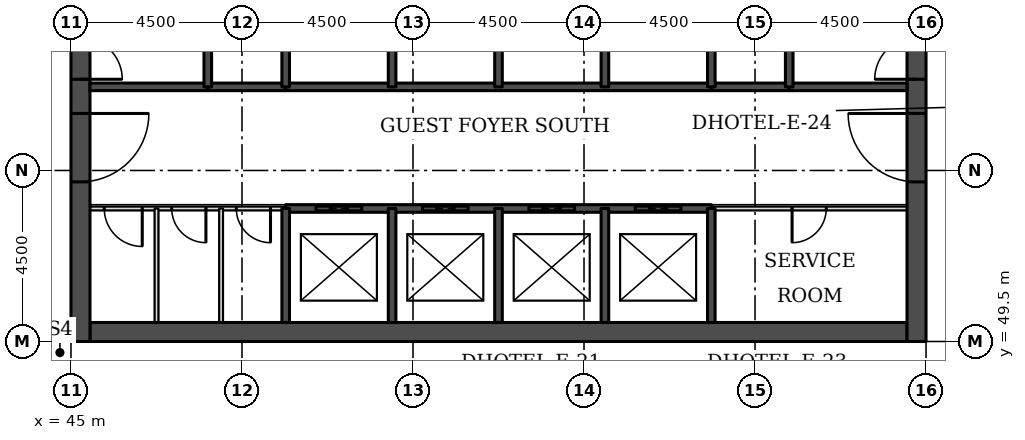
"""IFC4 building model, lengths in metres.
Left out: names, types, materials, properties, quantities, classifications, styles, units other than length and angle.
Written with IfcOpenShell. Run it as: python <this file> out.ifc"""

import sys

from ifc_helpers import new_model, si_unit, direction, frame, frame_2d, origin, place, context, subcontext, project, spatial, rectangle, extrude, element, fill, save


model = new_model("IFC4")
c1 = context("Model", 3, precision=1e-05, world=origin(), true_north=direction((0.0, 1.0)))
c2 = subcontext(c1, "Body", "Model", "MODEL_VIEW")
j1 = project(units=[si_unit("LENGTHUNIT", "METRE"), si_unit("PLANEANGLEUNIT", "RADIAN")], contexts=[c1])
p1 = place(None, origin())
s1 = spatial("IfcSite", under=j1, at=p1, CompositionType="ELEMENT")
p2 = place(p1, origin())
s2 = spatial("IfcBuilding", under=s1, at=p2, CompositionType="ELEMENT")
p3 = place(p2, frame((0.0, 0.0, 39.6)))
s3 = spatial("IfcBuildingStorey", under=s2, at=p3, CompositionType="ELEMENT", Elevation=39.6)
p4 = place(p3, frame((45.5, 49.75, 0.0), z_axis=(0.0, 0.0, 1.0), x_axis=(1.0, 0.0, 0.0)))
e1 = element("IfcWall", 1, at=p4, inside=s3, PredefinedType="SHEAR", context=c2, shape_type="SweptSolid", body=[
    extrude(rectangle(XDim=21.5, YDim=0.5, at=frame_2d((10.75, 0.0))), origin(), (0.0, 0.0, 1.0), 3.3),
])
p5 = place(p3, frame((45.25, 49.5, 0.0), z_axis=(0.0, 0.0, 1.0), x_axis=(0.0, 1.0, 0.0)))
e2 = element("IfcWall", 2, at=p5, inside=s3, PredefinedType="SHEAR", context=c2, shape_type="SweptSolid", body=[
    extrude(rectangle(XDim=22.5, YDim=0.5, at=frame_2d((11.25, 0.0))), origin(), (0.0, 0.0, 1.0), 3.3),
])
p6 = place(p5, frame((4.2, 0.0, 0.0)))
e3 = element("IfcOpeningElement", 3, at=p6, cuts=e2, PredefinedType="OPENING", context=c2, shape_type="SweptSolid", body=[
    extrude(rectangle(XDim=1.8, YDim=2.1, at=frame_2d((0.9, 1.05))), frame((0.0, 0.26, 0.0), z_axis=(0.0, -1.0, 0.0), x_axis=(1.0, 0.0, 0.0)), (0.0, 0.0, 1.0), 0.52),
])
p7 = place(p5, frame((6.9, 0.0, 0.0)))
e4 = element("IfcOpeningElement", 4, at=p7, cuts=e2, PredefinedType="OPENING", context=c2, shape_type="SweptSolid", body=[
    extrude(rectangle(XDim=1.1, YDim=2.1, at=frame_2d((0.55, 1.05))), frame((0.0, 0.26, 0.0), z_axis=(0.0, -1.0, 0.0), x_axis=(1.0, 0.0, 0.0)), (0.0, 0.0, 1.0), 0.52),
])
p8 = place(p5, frame((13.6, 0.0, 0.0)))
e5 = element("IfcOpeningElement", 5, at=p8, cuts=e2, PredefinedType="OPENING", context=c2, shape_type="SweptSolid", body=[
    extrude(rectangle(XDim=1.1, YDim=2.1, at=frame_2d((0.55, 1.05))), frame((0.0, 0.26, 0.0), z_axis=(0.0, -1.0, 0.0), x_axis=(1.0, 0.0, 0.0)), (0.0, 0.0, 1.0), 0.52),
])
p9 = place(p5, frame((16.5, 0.0, 0.0)))
e6 = element("IfcOpeningElement", 6, at=p9, cuts=e2, PredefinedType="OPENING", context=c2, shape_type="SweptSolid", body=[
    extrude(rectangle(XDim=1.8, YDim=2.1, at=frame_2d((0.9, 1.05))), frame((0.0, 0.26, 0.0), z_axis=(0.0, -1.0, 0.0), x_axis=(1.0, 0.0, 0.0)), (0.0, 0.0, 1.0), 0.52),
])
p10 = place(p3, frame((67.25, 49.5, 0.0), z_axis=(0.0, 0.0, 1.0), x_axis=(0.0, 1.0, 0.0)))
e7 = element("IfcWall", 7, at=p10, inside=s3, PredefinedType="SHEAR", context=c2, shape_type="SweptSolid", body=[
    extrude(rectangle(XDim=22.5, YDim=0.5, at=frame_2d((11.25, 0.0))), origin(), (0.0, 0.0, 1.0), 3.3),
])
p11 = place(p10, frame((4.2, 0.0, 0.0)))
e8 = element("IfcOpeningElement", 8, at=p11, cuts=e7, PredefinedType="OPENING", context=c2, shape_type="SweptSolid", body=[
    extrude(rectangle(XDim=1.8, YDim=2.1, at=frame_2d((0.9, 1.05))), frame((0.0, 0.26, 0.0), z_axis=(0.0, -1.0, 0.0), x_axis=(1.0, 0.0, 0.0)), (0.0, 0.0, 1.0), 0.52),
])
p12 = place(p10, frame((6.9, 0.0, 0.0)))
e9 = element("IfcOpeningElement", 9, at=p12, cuts=e7, PredefinedType="OPENING", context=c2, shape_type="SweptSolid", body=[
    extrude(rectangle(XDim=1.1, YDim=2.1, at=frame_2d((0.55, 1.05))), frame((0.0, 0.26, 0.0), z_axis=(0.0, -1.0, 0.0), x_axis=(1.0, 0.0, 0.0)), (0.0, 0.0, 1.0), 0.52),
])
p13 = place(p10, frame((13.6, 0.0, 0.0)))
e10 = element("IfcOpeningElement", 10, at=p13, cuts=e7, PredefinedType="OPENING", context=c2, shape_type="SweptSolid", body=[
    extrude(rectangle(XDim=1.1, YDim=2.1, at=frame_2d((0.55, 1.05))), frame((0.0, 0.26, 0.0), z_axis=(0.0, -1.0, 0.0), x_axis=(1.0, 0.0, 0.0)), (0.0, 0.0, 1.0), 0.52),
])
p14 = place(p10, frame((16.5, 0.0, 0.0)))
e11 = element("IfcOpeningElement", 11, at=p14, cuts=e7, PredefinedType="OPENING", context=c2, shape_type="SweptSolid", body=[
    extrude(rectangle(XDim=1.8, YDim=2.1, at=frame_2d((0.9, 1.05))), frame((0.0, 0.26, 0.0), z_axis=(0.0, -1.0, 0.0), x_axis=(1.0, 0.0, 0.0)), (0.0, 0.0, 1.0), 0.52),
])
p15 = place(p3, frame((45.5, 53.0, 0.0), z_axis=(0.0, 0.0, 1.0), x_axis=(1.0, 0.0, 0.0)))
e12 = element("IfcWall", 12, at=p15, inside=s3, PredefinedType="PARTITIONING", context=c2, shape_type="SweptSolid", body=[
    extrude(rectangle(XDim=5.15, YDim=0.1, at=frame_2d((2.575, 0.0))), origin(), (0.0, 0.0, 1.0), 3.08),
])
p16 = place(p15, frame((0.375, 0.0, 0.0)))
e13 = element("IfcOpeningElement", 13, at=p16, cuts=e12, PredefinedType="OPENING", context=c2, shape_type="SweptSolid", body=[
    extrude(rectangle(XDim=1.0, YDim=2.1, at=frame_2d((0.5, 1.05))), frame((0.0, 0.06, 0.0), z_axis=(0.0, -1.0, 0.0), x_axis=(1.0, 0.0, 0.0)), (0.0, 0.0, 1.0), 0.12),
])
p17 = place(p15, frame((2.151, 0.0, 0.0)))
e14 = element("IfcOpeningElement", 14, at=p17, cuts=e12, PredefinedType="OPENING", context=c2, shape_type="SweptSolid", body=[
    extrude(rectangle(XDim=0.9, YDim=2.1, at=frame_2d((0.45, 1.05))), frame((0.0, 0.06, 0.0), z_axis=(0.0, -1.0, 0.0), x_axis=(1.0, 0.0, 0.0)), (0.0, 0.0, 1.0), 0.12),
])
p18 = place(p15, frame((3.85, 0.0, 0.0)))
e15 = element("IfcOpeningElement", 15, at=p18, cuts=e12, PredefinedType="OPENING", context=c2, shape_type="SweptSolid", body=[
    extrude(rectangle(XDim=0.9, YDim=2.1, at=frame_2d((0.45, 1.05))), frame((0.0, 0.06, 0.0), z_axis=(0.0, -1.0, 0.0), x_axis=(1.0, 0.0, 0.0)), (0.0, 0.0, 1.0), 0.12),
])
p19 = place(p3, frame((61.85, 53.0, 0.0), z_axis=(0.0, 0.0, 1.0), x_axis=(1.0, 0.0, 0.0)))
e16 = element("IfcWall", 16, at=p19, inside=s3, PredefinedType="PARTITIONING", context=c2, shape_type="SweptSolid", body=[
    extrude(rectangle(XDim=5.15, YDim=0.1, at=frame_2d((2.575, 0.0))), origin(), (0.0, 0.0, 1.0), 3.08),
])
p20 = place(p19, frame((2.125, 0.0, 0.0)))
e17 = element("IfcOpeningElement", 17, at=p20, cuts=e16, PredefinedType="OPENING", context=c2, shape_type="SweptSolid", body=[
    extrude(rectangle(XDim=0.9, YDim=2.1, at=frame_2d((0.45, 1.05))), frame((0.0, 0.06, 0.0), z_axis=(0.0, -1.0, 0.0), x_axis=(1.0, 0.0, 0.0)), (0.0, 0.0, 1.0), 0.12),
])
p21 = place(p3, frame((50.65, 53.0, 0.0), z_axis=(0.0, 0.0, 1.0), x_axis=(1.0, 0.0, 0.0)))
e18 = element("IfcWall", 18, at=p21, inside=s3, PredefinedType="SOLIDWALL", context=c2, shape_type="SweptSolid", body=[
    extrude(rectangle(XDim=11.2, YDim=0.2, at=frame_2d((5.6, 0.0))), origin(), (0.0, 0.0, 1.0), 3.08),
])
p22 = place(p21, frame((0.8, 0.0, 0.0)))
e19 = element("IfcOpeningElement", 19, at=p22, cuts=e18, PredefinedType="OPENING", context=c2, shape_type="SweptSolid", body=[
    extrude(rectangle(XDim=1.2, YDim=2.1, at=frame_2d((0.6, 1.05))), frame((0.0, 0.11, 0.0), z_axis=(0.0, -1.0, 0.0), x_axis=(1.0, 0.0, 0.0)), (0.0, 0.0, 1.0), 0.22),
])
p23 = place(p21, frame((3.6, 0.0, 0.0)))
e20 = element("IfcOpeningElement", 20, at=p23, cuts=e18, PredefinedType="OPENING", context=c2, shape_type="SweptSolid", body=[
    extrude(rectangle(XDim=1.2, YDim=2.1, at=frame_2d((0.6, 1.05))), frame((0.0, 0.11, 0.0), z_axis=(0.0, -1.0, 0.0), x_axis=(1.0, 0.0, 0.0)), (0.0, 0.0, 1.0), 0.22),
])
p24 = place(p21, frame((6.4, 0.0, 0.0)))
e21 = element("IfcOpeningElement", 21, at=p24, cuts=e18, PredefinedType="OPENING", context=c2, shape_type="SweptSolid", body=[
    extrude(rectangle(XDim=1.2, YDim=2.1, at=frame_2d((0.6, 1.05))), frame((0.0, 0.11, 0.0), z_axis=(0.0, -1.0, 0.0), x_axis=(1.0, 0.0, 0.0)), (0.0, 0.0, 1.0), 0.22),
])
p25 = place(p21, frame((9.2, 0.0, 0.0)))
e22 = element("IfcOpeningElement", 22, at=p25, cuts=e18, PredefinedType="OPENING", context=c2, shape_type="SweptSolid", body=[
    extrude(rectangle(XDim=1.2, YDim=2.1, at=frame_2d((0.6, 1.05))), frame((0.0, 0.11, 0.0), z_axis=(0.0, -1.0, 0.0), x_axis=(1.0, 0.0, 0.0)), (0.0, 0.0, 1.0), 0.22),
])
for number, where, z_axis, x_axis in (
    (23, (48.6, 56.2, 0.0), (0.0, 0.0, 1.0), (1.0, 0.0, 0.0)),
    (24, (61.85, 56.2, 0.0), (0.0, 0.0, 1.0), (1.0, 0.0, 0.0)),
):
    element("IfcWall", number, at=place(p3, frame(where, z_axis=z_axis, x_axis=x_axis)), inside=s3, PredefinedType="SOLIDWALL", context=c2, shape_type="SweptSolid", body=[
        extrude(rectangle(XDim=2.05, YDim=0.2, at=frame_2d((1.025, 0.0))), origin(), (0.0, 0.0, 1.0), 3.08),
    ])
p26 = place(p3, frame((45.5, 56.2, 0.0), z_axis=(0.0, 0.0, 1.0), x_axis=(1.0, 0.0, 0.0)))
e25 = element("IfcWall", 25, at=p26, inside=s3, PredefinedType="SOLIDWALL", context=c2, shape_type="SweptSolid", body=[
    extrude(rectangle(XDim=3.1, YDim=0.2, at=frame_2d((1.55, 0.0))), origin(), (0.0, 0.0, 1.0), 3.08),
])
p27 = place(p3, frame((50.65, 56.2, 0.0), z_axis=(0.0, 0.0, 1.0), x_axis=(1.0, 0.0, 0.0)))
e26 = element("IfcWall", 26, at=p27, inside=s3, PredefinedType="SOLIDWALL", context=c2, shape_type="SweptSolid", body=[
    extrude(rectangle(XDim=11.2, YDim=0.2, at=frame_2d((5.6, 0.0))), origin(), (0.0, 0.0, 1.0), 3.08),
])
p28 = place(p3, frame((63.9, 56.2, 0.0), z_axis=(0.0, 0.0, 1.0), x_axis=(1.0, 0.0, 0.0)))
e27 = element("IfcWall", 27, at=p28, inside=s3, PredefinedType="SOLIDWALL", context=c2, shape_type="SweptSolid", body=[
    extrude(rectangle(XDim=3.1, YDim=0.2, at=frame_2d((1.55, 0.0))), origin(), (0.0, 0.0, 1.0), 3.08),
])
p29 = place(p3, frame((47.251, 50.0, 0.0), z_axis=(0.0, 0.0, 1.0), x_axis=(0.0, 1.0, 0.0)))
e28 = element("IfcWall", 28, at=p29, inside=s3, PredefinedType="PARTITIONING", context=c2, shape_type="SweptSolid", body=[
    extrude(rectangle(XDim=3.0, YDim=0.1, at=frame_2d((1.5, 0.0))), origin(), (0.0, 0.0, 1.0), 3.08),
])
p30 = place(p3, frame((48.6, 56.2, 0.0), z_axis=(0.0, 0.0, 1.0), x_axis=(0.0, 1.0, 0.0)))
e29 = element("IfcWall", 29, at=p30, inside=s3, PredefinedType="SOLIDWALL", context=c2, shape_type="SweptSolid", body=[
    extrude(rectangle(XDim=5.8, YDim=0.2, at=frame_2d((2.9, 0.0))), origin(), (0.0, 0.0, 1.0), 3.08),
])
p31 = place(p3, frame((48.95, 50.0, 0.0), z_axis=(0.0, 0.0, 1.0), x_axis=(0.0, 1.0, 0.0)))
e30 = element("IfcWall", 30, at=p31, inside=s3, PredefinedType="PARTITIONING", context=c2, shape_type="SweptSolid", body=[
    extrude(rectangle(XDim=3.0, YDim=0.1, at=frame_2d((1.5, 0.0))), origin(), (0.0, 0.0, 1.0), 3.08),
])
p32 = place(p3, frame((50.65, 50.0, 0.0), z_axis=(0.0, 0.0, 1.0), x_axis=(0.0, 1.0, 0.0)))
e31 = element("IfcWall", 31, at=p32, inside=s3, PredefinedType="SOLIDWALL", context=c2, shape_type="SweptSolid", body=[
    extrude(rectangle(XDim=3.0, YDim=0.2, at=frame_2d((1.5, 0.0))), origin(), (0.0, 0.0, 1.0), 3.08),
])
p33 = place(p3, frame((50.65, 56.2, 0.0), z_axis=(0.0, 0.0, 1.0), x_axis=(0.0, 1.0, 0.0)))
e32 = element("IfcWall", 32, at=p33, inside=s3, PredefinedType="SOLIDWALL", context=c2, shape_type="SweptSolid", body=[
    extrude(rectangle(XDim=2.8, YDim=0.2, at=frame_2d((1.4, 0.0))), origin(), (0.0, 0.0, 1.0), 3.08),
])
p34 = place(p3, frame((53.45, 50.0, 0.0), z_axis=(0.0, 0.0, 1.0), x_axis=(0.0, 1.0, 0.0)))
e33 = element("IfcWall", 33, at=p34, inside=s3, PredefinedType="SOLIDWALL", context=c2, shape_type="SweptSolid", body=[
    extrude(rectangle(XDim=3.0, YDim=0.2, at=frame_2d((1.5, 0.0))), origin(), (0.0, 0.0, 1.0), 3.08),
])
p35 = place(p3, frame((53.45, 56.2, 0.0), z_axis=(0.0, 0.0, 1.0), x_axis=(0.0, 1.0, 0.0)))
e34 = element("IfcWall", 34, at=p35, inside=s3, PredefinedType="SOLIDWALL", context=c2, shape_type="SweptSolid", body=[
    extrude(rectangle(XDim=2.8, YDim=0.2, at=frame_2d((1.4, 0.0))), origin(), (0.0, 0.0, 1.0), 3.08),
])
p36 = place(p3, frame((56.25, 50.0, 0.0), z_axis=(0.0, 0.0, 1.0), x_axis=(0.0, 1.0, 0.0)))
e35 = element("IfcWall", 35, at=p36, inside=s3, PredefinedType="SOLIDWALL", context=c2, shape_type="SweptSolid", body=[
    extrude(rectangle(XDim=3.0, YDim=0.2, at=frame_2d((1.5, 0.0))), origin(), (0.0, 0.0, 1.0), 3.08),
])
p37 = place(p3, frame((56.25, 56.2, 0.0), z_axis=(0.0, 0.0, 1.0), x_axis=(0.0, 1.0, 0.0)))
e36 = element("IfcWall", 36, at=p37, inside=s3, PredefinedType="SOLIDWALL", context=c2, shape_type="SweptSolid", body=[
    extrude(rectangle(XDim=2.8, YDim=0.2, at=frame_2d((1.4, 0.0))), origin(), (0.0, 0.0, 1.0), 3.08),
])
p38 = place(p3, frame((59.05, 50.0, 0.0), z_axis=(0.0, 0.0, 1.0), x_axis=(0.0, 1.0, 0.0)))
e37 = element("IfcWall", 37, at=p38, inside=s3, PredefinedType="SOLIDWALL", context=c2, shape_type="SweptSolid", body=[
    extrude(rectangle(XDim=3.0, YDim=0.2, at=frame_2d((1.5, 0.0))), origin(), (0.0, 0.0, 1.0), 3.08),
])
p39 = place(p3, frame((59.05, 56.2, 0.0), z_axis=(0.0, 0.0, 1.0), x_axis=(0.0, 1.0, 0.0)))
e38 = element("IfcWall", 38, at=p39, inside=s3, PredefinedType="SOLIDWALL", context=c2, shape_type="SweptSolid", body=[
    extrude(rectangle(XDim=2.8, YDim=0.2, at=frame_2d((1.4, 0.0))), origin(), (0.0, 0.0, 1.0), 3.08),
])
p40 = place(p3, frame((61.85, 50.0, 0.0), z_axis=(0.0, 0.0, 1.0), x_axis=(0.0, 1.0, 0.0)))
e39 = element("IfcWall", 39, at=p40, inside=s3, PredefinedType="SOLIDWALL", context=c2, shape_type="SweptSolid", body=[
    extrude(rectangle(XDim=3.0, YDim=0.2, at=frame_2d((1.5, 0.0))), origin(), (0.0, 0.0, 1.0), 3.08),
])
p41 = place(p3, frame((61.85, 56.2, 0.0), z_axis=(0.0, 0.0, 1.0), x_axis=(0.0, 1.0, 0.0)))
e40 = element("IfcWall", 40, at=p41, inside=s3, PredefinedType="SOLIDWALL", context=c2, shape_type="SweptSolid", body=[
    extrude(rectangle(XDim=2.8, YDim=0.2, at=frame_2d((1.4, 0.0))), origin(), (0.0, 0.0, 1.0), 3.08),
])
p42 = place(p3, frame((63.9, 56.2, 0.0), z_axis=(0.0, 0.0, 1.0), x_axis=(0.0, 1.0, 0.0)))
e41 = element("IfcWall", 41, at=p42, inside=s3, PredefinedType="SOLIDWALL", context=c2, shape_type="SweptSolid", body=[
    extrude(rectangle(XDim=5.8, YDim=0.2, at=frame_2d((2.9, 0.0))), origin(), (0.0, 0.0, 1.0), 3.08),
])
p43 = place(p22, origin())
e42 = element("IfcDoor", 42, at=p43, inside=s3, OperationType="DOUBLE_DOOR_SLIDING", PredefinedType="DOOR", context=c2, shape_type="SweptSolid", body=[
    extrude(rectangle(XDim=1.2, YDim=2.1, at=frame_2d((0.6, 1.05))), frame((0.0, 0.025, 0.0), z_axis=(0.0, -1.0, 0.0), x_axis=(1.0, 0.0, 0.0)), (0.0, 0.0, 1.0), 0.05),
])
fill(e19, e42)
p44 = place(p23, origin())
e43 = element("IfcDoor", 43, at=p44, inside=s3, OperationType="DOUBLE_DOOR_SLIDING", PredefinedType="DOOR", context=c2, shape_type="SweptSolid", body=[
    extrude(rectangle(XDim=1.2, YDim=2.1, at=frame_2d((0.6, 1.05))), frame((0.0, 0.025, 0.0), z_axis=(0.0, -1.0, 0.0), x_axis=(1.0, 0.0, 0.0)), (0.0, 0.0, 1.0), 0.05),
])
fill(e20, e43)
p45 = place(p24, origin())
e44 = element("IfcDoor", 44, at=p45, inside=s3, OperationType="DOUBLE_DOOR_SLIDING", PredefinedType="DOOR", context=c2, shape_type="SweptSolid", body=[
    extrude(rectangle(XDim=1.2, YDim=2.1, at=frame_2d((0.6, 1.05))), frame((0.0, 0.025, 0.0), z_axis=(0.0, -1.0, 0.0), x_axis=(1.0, 0.0, 0.0)), (0.0, 0.0, 1.0), 0.05),
])
fill(e21, e44)
p46 = place(p25, origin())
e45 = element("IfcDoor", 45, at=p46, inside=s3, OperationType="DOUBLE_DOOR_SLIDING", PredefinedType="DOOR", context=c2, shape_type="SweptSolid", body=[
    extrude(rectangle(XDim=1.2, YDim=2.1, at=frame_2d((0.6, 1.05))), frame((0.0, 0.025, 0.0), z_axis=(0.0, -1.0, 0.0), x_axis=(1.0, 0.0, 0.0)), (0.0, 0.0, 1.0), 0.05),
])
fill(e22, e45)
p47 = place(p6, frame((1.8, 0.0, 0.0), z_axis=(0.0, 0.0, 1.0), x_axis=(-1.0, 0.0, 0.0)))
e46 = element("IfcDoor", 46, at=p47, inside=s3, OperationType="SINGLE_SWING_LEFT", PredefinedType="DOOR", context=c2, shape_type="SweptSolid", body=[
    extrude(rectangle(XDim=1.8, YDim=2.1, at=frame_2d((0.9, 1.05))), frame((0.0, 0.025, 0.0), z_axis=(0.0, -1.0, 0.0), x_axis=(1.0, 0.0, 0.0)), (0.0, 0.0, 1.0), 0.05),
])
fill(e3, e46)
p48 = place(p7, frame((1.1, 0.0, 0.0), z_axis=(0.0, 0.0, 1.0), x_axis=(-1.0, 0.0, 0.0)))
e47 = element("IfcDoor", 47, at=p48, inside=s3, OperationType="SINGLE_SWING_RIGHT", PredefinedType="DOOR", context=c2, shape_type="SweptSolid", body=[
    extrude(rectangle(XDim=1.1, YDim=2.1, at=frame_2d((0.55, 1.05))), frame((0.0, 0.025, 0.0), z_axis=(0.0, -1.0, 0.0), x_axis=(1.0, 0.0, 0.0)), (0.0, 0.0, 1.0), 0.05),
])
fill(e4, e47)
p49 = place(p11, origin())
e48 = element("IfcDoor", 48, at=p49, inside=s3, OperationType="SINGLE_SWING_RIGHT", PredefinedType="DOOR", context=c2, shape_type="SweptSolid", body=[
    extrude(rectangle(XDim=1.8, YDim=2.1, at=frame_2d((0.9, 1.05))), frame((0.0, 0.025, 0.0), z_axis=(0.0, -1.0, 0.0), x_axis=(1.0, 0.0, 0.0)), (0.0, 0.0, 1.0), 0.05),
])
fill(e8, e48)
p50 = place(p12, origin())
e49 = element("IfcDoor", 49, at=p50, inside=s3, OperationType="SINGLE_SWING_LEFT", PredefinedType="DOOR", context=c2, shape_type="SweptSolid", body=[
    extrude(rectangle(XDim=1.1, YDim=2.1, at=frame_2d((0.55, 1.05))), frame((0.0, 0.025, 0.0), z_axis=(0.0, -1.0, 0.0), x_axis=(1.0, 0.0, 0.0)), (0.0, 0.0, 1.0), 0.05),
])
fill(e9, e49)
p51 = place(p20, frame((0.9, 0.0, 0.0), z_axis=(0.0, 0.0, 1.0), x_axis=(-1.0, 0.0, 0.0)))
e50 = element("IfcDoor", 50, at=p51, inside=s3, OperationType="SINGLE_SWING_RIGHT", PredefinedType="DOOR", context=c2, shape_type="SweptSolid", body=[
    extrude(rectangle(XDim=0.9, YDim=2.1, at=frame_2d((0.45, 1.05))), frame((0.0, 0.025, 0.0), z_axis=(0.0, -1.0, 0.0), x_axis=(1.0, 0.0, 0.0)), (0.0, 0.0, 1.0), 0.05),
])
fill(e17, e50)
p52 = place(p16, frame((1.0, 0.0, 0.0), z_axis=(0.0, 0.0, 1.0), x_axis=(-1.0, 0.0, 0.0)))
e51 = element("IfcDoor", 51, at=p52, inside=s3, OperationType="SINGLE_SWING_LEFT", PredefinedType="DOOR", context=c2, shape_type="SweptSolid", body=[
    extrude(rectangle(XDim=1.0, YDim=2.1, at=frame_2d((0.5, 1.05))), frame((0.0, 0.025, 0.0), z_axis=(0.0, -1.0, 0.0), x_axis=(1.0, 0.0, 0.0)), (0.0, 0.0, 1.0), 0.05),
])
fill(e13, e51)
p53 = place(p17, frame((0.9, 0.0, 0.0), z_axis=(0.0, 0.0, 1.0), x_axis=(-1.0, 0.0, 0.0)))
e52 = element("IfcDoor", 52, at=p53, inside=s3, OperationType="SINGLE_SWING_LEFT", PredefinedType="DOOR", context=c2, shape_type="SweptSolid", body=[
    extrude(rectangle(XDim=0.9, YDim=2.1, at=frame_2d((0.45, 1.05))), frame((0.0, 0.025, 0.0), z_axis=(0.0, -1.0, 0.0), x_axis=(1.0, 0.0, 0.0)), (0.0, 0.0, 1.0), 0.05),
])
fill(e14, e52)
p54 = place(p18, frame((0.9, 0.0, 0.0), z_axis=(0.0, 0.0, 1.0), x_axis=(-1.0, 0.0, 0.0)))
e53 = element("IfcDoor", 53, at=p54, inside=s3, OperationType="SINGLE_SWING_LEFT", PredefinedType="DOOR", context=c2, shape_type="SweptSolid", body=[
    extrude(rectangle(XDim=0.9, YDim=2.1, at=frame_2d((0.45, 1.05))), frame((0.0, 0.025, 0.0), z_axis=(0.0, -1.0, 0.0), x_axis=(1.0, 0.0, 0.0)), (0.0, 0.0, 1.0), 0.05),
])
fill(e15, e53)
save(model, sys.argv[1])
